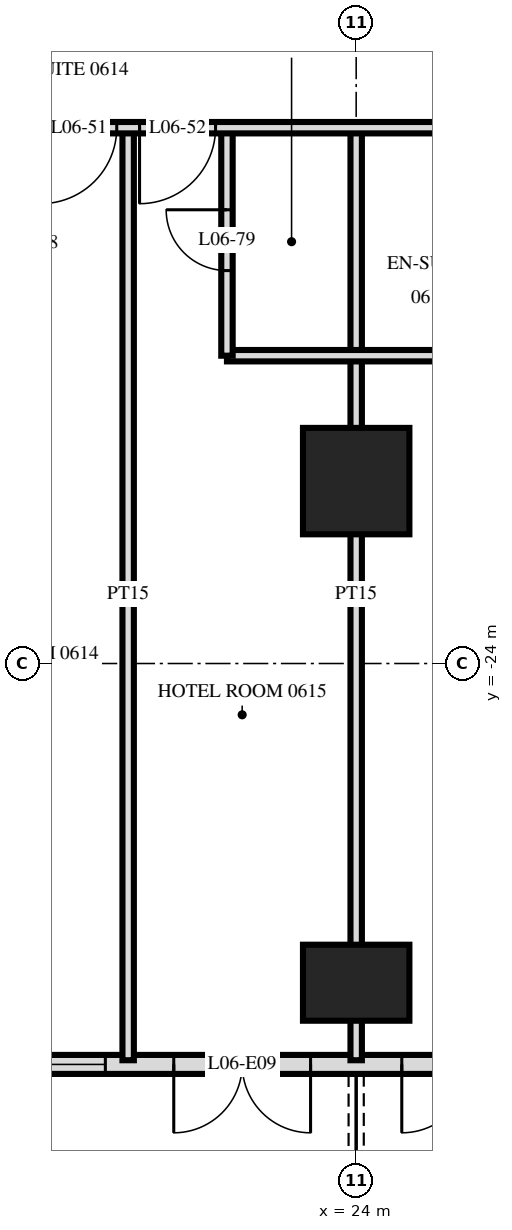
"""IFC4 building model, lengths in metres.
Left out: names, types, materials, properties, quantities, classifications, styles, units other than length and angle.
Written with IfcOpenShell. Run it as: python <this file> out.ifc"""

import sys

from ifc_helpers import new_model, si_unit, direction, frame, frame_2d, origin, origin_2d, place, context, subcontext, project, spatial, rectangle, extrude, element, fill, save


model = new_model("IFC4")
c1 = context("Model", 3, precision=1e-05, world=origin(), true_north=direction((0.0, 1.0)))
c2 = subcontext(c1, "Body", "Model", "MODEL_VIEW")
j1 = project(units=[si_unit("LENGTHUNIT", "METRE"), si_unit("PLANEANGLEUNIT", "RADIAN")], contexts=[c1])
p1 = place(None, origin())
s1 = spatial("IfcSite", under=j1, at=p1, CompositionType="ELEMENT")
p2 = place(p1, origin())
s2 = spatial("IfcBuilding", under=s1, at=p2, CompositionType="ELEMENT")
p3 = place(p2, frame((0.0, 0.0, 31.2)))
s3 = spatial("IfcBuildingStorey", under=s2, at=p3, CompositionType="ELEMENT", Elevation=31.2)
p4 = place(p3, frame((24.0, -28.2, 0.0), z_axis=(0.0, 0.0, 1.0), x_axis=(1.0, 0.0, 0.0)))
e1 = element("IfcColumn", 1, at=p4, inside=s3, PredefinedType="COLUMN", context=c2, shape_type="SweptSolid", body=[
    extrude(rectangle(XDim=1.4, YDim=1.0, at=origin_2d()), origin(), (0.0, 0.0, 1.0), 3.6),
])
p5 = place(p3, frame((24.0, -21.6, 0.0), z_axis=(0.0, 0.0, 1.0), x_axis=(1.0, 0.0, 0.0)))
e2 = element("IfcColumn", 2, at=p5, inside=s3, PredefinedType="COLUMN", context=c2, shape_type="SweptSolid", body=[
    extrude(rectangle(XDim=1.4, YDim=1.4, at=origin_2d()), origin(), (0.0, 0.0, 1.0), 3.6),
])
p6 = place(p3, frame((-28.775, -29.275, 0.0), z_axis=(0.0, 0.0, 1.0), x_axis=(1.0, 0.0, 0.0)))
e3 = element("IfcWall", 3, at=p6, inside=s3, PredefinedType="SOLIDWALL", context=c2, shape_type="SweptSolid", body=[
    extrude(rectangle(XDim=57.551, YDim=0.25, at=frame_2d((28.775, 0.0))), origin(), (0.0, 0.0, 1.0), 3.32),
])
p7 = place(p6, frame((0.575, 0.0, 0.0)))
e4 = element("IfcOpeningElement", 4, at=p7, cuts=e3, PredefinedType="OPENING", context=c2, shape_type="SweptSolid", body=[
    extrude(rectangle(XDim=1.8, YDim=2.4, at=frame_2d((0.9, 1.2))), frame((0.0, 0.135, 0.0), z_axis=(0.0, -1.0, 0.0), x_axis=(1.0, 0.0, 0.0)), (0.0, 0.0, 1.0), 0.27),
])
p8 = place(p6, frame((5.375, 0.0, 0.0)))
e5 = element("IfcOpeningElement", 5, at=p8, cuts=e3, PredefinedType="OPENING", context=c2, shape_type="SweptSolid", body=[
    extrude(rectangle(XDim=1.8, YDim=2.4, at=frame_2d((0.9, 1.2))), frame((0.0, 0.135, 0.0), z_axis=(0.0, -1.0, 0.0), x_axis=(1.0, 0.0, 0.0)), (0.0, 0.0, 1.0), 0.27),
])
p9 = place(p6, frame((8.075, 0.0, 0.3)))
e6 = element("IfcOpeningElement", 6, at=p9, cuts=e3, PredefinedType="OPENING", context=c2, shape_type="SweptSolid", body=[
    extrude(rectangle(XDim=2.4, YDim=2.1, at=frame_2d((1.2, 1.05))), frame((0.0, 0.135, 0.0), z_axis=(0.0, -1.0, 0.0), x_axis=(1.0, 0.0, 0.0)), (0.0, 0.0, 1.0), 0.27),
])
p10 = place(p6, frame((11.375, 0.0, 0.0)))
e7 = element("IfcOpeningElement", 7, at=p10, cuts=e3, PredefinedType="OPENING", context=c2, shape_type="SweptSolid", body=[
    extrude(rectangle(XDim=1.8, YDim=2.4, at=frame_2d((0.9, 1.2))), frame((0.0, 0.135, 0.0), z_axis=(0.0, -1.0, 0.0), x_axis=(1.0, 0.0, 0.0)), (0.0, 0.0, 1.0), 0.27),
])
p11 = place(p6, frame((14.075, 0.0, 0.3)))
e8 = element("IfcOpeningElement", 8, at=p11, cuts=e3, PredefinedType="OPENING", context=c2, shape_type="SweptSolid", body=[
    extrude(rectangle(XDim=2.4, YDim=2.1, at=frame_2d((1.2, 1.05))), frame((0.0, 0.135, 0.0), z_axis=(0.0, -1.0, 0.0), x_axis=(1.0, 0.0, 0.0)), (0.0, 0.0, 1.0), 0.27),
])
p12 = place(p6, frame((17.375, 0.0, 0.0)))
e9 = element("IfcOpeningElement", 9, at=p12, cuts=e3, PredefinedType="OPENING", context=c2, shape_type="SweptSolid", body=[
    extrude(rectangle(XDim=1.8, YDim=2.4, at=frame_2d((0.9, 1.2))), frame((0.0, 0.135, 0.0), z_axis=(0.0, -1.0, 0.0), x_axis=(1.0, 0.0, 0.0)), (0.0, 0.0, 1.0), 0.27),
])
p13 = place(p6, frame((20.075, 0.0, 0.3)))
e10 = element("IfcOpeningElement", 10, at=p13, cuts=e3, PredefinedType="OPENING", context=c2, shape_type="SweptSolid", body=[
    extrude(rectangle(XDim=2.4, YDim=2.1, at=frame_2d((1.2, 1.05))), frame((0.0, 0.135, 0.0), z_axis=(0.0, -1.0, 0.0), x_axis=(1.0, 0.0, 0.0)), (0.0, 0.0, 1.0), 0.27),
])
p14 = place(p6, frame((23.075, 0.0, 0.3)))
e11 = element("IfcOpeningElement", 11, at=p14, cuts=e3, PredefinedType="OPENING", context=c2, shape_type="SweptSolid", body=[
    extrude(rectangle(XDim=2.4, YDim=2.1, at=frame_2d((1.2, 1.05))), frame((0.0, 0.135, 0.0), z_axis=(0.0, -1.0, 0.0), x_axis=(1.0, 0.0, 0.0)), (0.0, 0.0, 1.0), 0.27),
])
p15 = place(p6, frame((26.375, 0.0, 0.0)))
e12 = element("IfcOpeningElement", 12, at=p15, cuts=e3, PredefinedType="OPENING", context=c2, shape_type="SweptSolid", body=[
    extrude(rectangle(XDim=1.8, YDim=2.4, at=frame_2d((0.9, 1.2))), frame((0.0, 0.135, 0.0), z_axis=(0.0, -1.0, 0.0), x_axis=(1.0, 0.0, 0.0)), (0.0, 0.0, 1.0), 0.27),
])
p16 = place(p6, frame((29.375, 0.0, 0.0)))
e13 = element("IfcOpeningElement", 13, at=p16, cuts=e3, PredefinedType="OPENING", context=c2, shape_type="SweptSolid", body=[
    extrude(rectangle(XDim=1.8, YDim=2.4, at=frame_2d((0.9, 1.2))), frame((0.0, 0.135, 0.0), z_axis=(0.0, -1.0, 0.0), x_axis=(1.0, 0.0, 0.0)), (0.0, 0.0, 1.0), 0.27),
])
p17 = place(p6, frame((32.075, 0.0, 0.3)))
e14 = element("IfcOpeningElement", 14, at=p17, cuts=e3, PredefinedType="OPENING", context=c2, shape_type="SweptSolid", body=[
    extrude(rectangle(XDim=2.4, YDim=2.1, at=frame_2d((1.2, 1.05))), frame((0.0, 0.135, 0.0), z_axis=(0.0, -1.0, 0.0), x_axis=(1.0, 0.0, 0.0)), (0.0, 0.0, 1.0), 0.27),
])
p18 = place(p6, frame((35.375, 0.0, 0.0)))
e15 = element("IfcOpeningElement", 15, at=p18, cuts=e3, PredefinedType="OPENING", context=c2, shape_type="SweptSolid", body=[
    extrude(rectangle(XDim=1.8, YDim=2.4, at=frame_2d((0.9, 1.2))), frame((0.0, 0.135, 0.0), z_axis=(0.0, -1.0, 0.0), x_axis=(1.0, 0.0, 0.0)), (0.0, 0.0, 1.0), 0.27),
])
p19 = place(p6, frame((38.075, 0.0, 0.3)))
e16 = element("IfcOpeningElement", 16, at=p19, cuts=e3, PredefinedType="OPENING", context=c2, shape_type="SweptSolid", body=[
    extrude(rectangle(XDim=2.4, YDim=2.1, at=frame_2d((1.2, 1.05))), frame((0.0, 0.135, 0.0), z_axis=(0.0, -1.0, 0.0), x_axis=(1.0, 0.0, 0.0)), (0.0, 0.0, 1.0), 0.27),
])
p20 = place(p6, frame((41.375, 0.0, 0.0)))
e17 = element("IfcOpeningElement", 17, at=p20, cuts=e3, PredefinedType="OPENING", context=c2, shape_type="SweptSolid", body=[
    extrude(rectangle(XDim=1.8, YDim=2.4, at=frame_2d((0.9, 1.2))), frame((0.0, 0.135, 0.0), z_axis=(0.0, -1.0, 0.0), x_axis=(1.0, 0.0, 0.0)), (0.0, 0.0, 1.0), 0.27),
])
p21 = place(p6, frame((44.075, 0.0, 0.3)))
e18 = element("IfcOpeningElement", 18, at=p21, cuts=e3, PredefinedType="OPENING", context=c2, shape_type="SweptSolid", body=[
    extrude(rectangle(XDim=2.4, YDim=2.1, at=frame_2d((1.2, 1.05))), frame((0.0, 0.135, 0.0), z_axis=(0.0, -1.0, 0.0), x_axis=(1.0, 0.0, 0.0)), (0.0, 0.0, 1.0), 0.27),
])
p22 = place(p6, frame((47.075, 0.0, 0.3)))
e19 = element("IfcOpeningElement", 19, at=p22, cuts=e3, PredefinedType="OPENING", context=c2, shape_type="SweptSolid", body=[
    extrude(rectangle(XDim=2.4, YDim=2.1, at=frame_2d((1.2, 1.05))), frame((0.0, 0.135, 0.0), z_axis=(0.0, -1.0, 0.0), x_axis=(1.0, 0.0, 0.0)), (0.0, 0.0, 1.0), 0.27),
])
p23 = place(p6, frame((50.375, 0.0, 0.0)))
e20 = element("IfcOpeningElement", 20, at=p23, cuts=e3, PredefinedType="OPENING", context=c2, shape_type="SweptSolid", body=[
    extrude(rectangle(XDim=1.8, YDim=2.4, at=frame_2d((0.9, 1.2))), frame((0.0, 0.135, 0.0), z_axis=(0.0, -1.0, 0.0), x_axis=(1.0, 0.0, 0.0)), (0.0, 0.0, 1.0), 0.27),
])
p24 = place(p6, frame((53.375, 0.0, 0.0)))
e21 = element("IfcOpeningElement", 21, at=p24, cuts=e3, PredefinedType="OPENING", context=c2, shape_type="SweptSolid", body=[
    extrude(rectangle(XDim=1.8, YDim=2.4, at=frame_2d((0.9, 1.2))), frame((0.0, 0.135, 0.0), z_axis=(0.0, -1.0, 0.0), x_axis=(1.0, 0.0, 0.0)), (0.0, 0.0, 1.0), 0.27),
])
p25 = place(p3, frame((24.0, -29.22, 0.0), z_axis=(0.0, 0.0, 1.0), x_axis=(0.0, 1.0, 0.0)))
e22 = element("IfcWall", 22, at=p25, inside=s3, PredefinedType="PARTITIONING", context=c2, shape_type="SweptSolid", body=[
    extrude(rectangle(XDim=12.27, YDim=0.15, at=frame_2d((6.135, 0.0))), origin(), (0.0, 0.0, 1.0), 3.32),
])
p26 = place(p3, frame((22.3, -19.95, 0.0), z_axis=(0.0, 0.0, 1.0), x_axis=(0.0, 1.0, 0.0)))
e23 = element("IfcWall", 23, at=p26, inside=s3, PredefinedType="PARTITIONING", context=c2, shape_type="SweptSolid", body=[
    extrude(rectangle(XDim=3.0, YDim=0.15, at=frame_2d((1.5, 0.0))), origin(), (0.0, 0.0, 1.0), 3.32),
])
p27 = place(p26, frame((1.12, 0.0, 0.0)))
e24 = element("IfcOpeningElement", 24, at=p27, cuts=e23, PredefinedType="OPENING", context=c2, shape_type="SweptSolid", body=[
    extrude(rectangle(XDim=0.8, YDim=2.1, at=frame_2d((0.4, 1.05))), frame((0.0, 0.085, 0.0), z_axis=(0.0, -1.0, 0.0), x_axis=(1.0, 0.0, 0.0)), (0.0, 0.0, 1.0), 0.17),
])
p28 = place(p3, frame((21.0, -29.22, 0.0), z_axis=(0.0, 0.0, 1.0), x_axis=(0.0, 1.0, 0.0)))
e25 = element("IfcWall", 25, at=p28, inside=s3, PredefinedType="PARTITIONING", context=c2, shape_type="SweptSolid", body=[
    extrude(rectangle(XDim=12.27, YDim=0.15, at=frame_2d((6.135, 0.0))), origin(), (0.0, 0.0, 1.0), 3.32),
])
p29 = place(p3, frame((22.3, -19.95, 0.0), z_axis=(0.0, 0.0, 1.0), x_axis=(1.0, 0.0, 0.0)))
e26 = element("IfcWall", 26, at=p29, inside=s3, PredefinedType="PARTITIONING", context=c2, shape_type="SweptSolid", body=[
    extrude(rectangle(XDim=4.7, YDim=0.15, at=frame_2d((2.35, 0.0))), origin(), (0.0, 0.0, 1.0), 3.32),
])
p30 = place(p3, frame((-33.12, -16.95, 0.0), z_axis=(0.0, 0.0, 1.0), x_axis=(1.0, 0.0, 0.0)))
e27 = element("IfcWall", 27, at=p30, inside=s3, PredefinedType="PARTITIONING", context=c2, shape_type="SweptSolid", body=[
    extrude(rectangle(XDim=66.24, YDim=0.15, at=frame_2d((33.12, 0.0))), origin(), (0.0, 0.0, 1.0), 3.32),
])
p31 = place(p30, frame((9.27, 0.0, 0.0)))
e28 = element("IfcOpeningElement", 28, at=p31, cuts=e27, PredefinedType="OPENING", context=c2, shape_type="SweptSolid", body=[
    extrude(rectangle(XDim=1.0, YDim=2.1, at=frame_2d((0.5, 1.05))), frame((0.0, 0.085, 0.0), z_axis=(0.0, -1.0, 0.0), x_axis=(1.0, 0.0, 0.0)), (0.0, 0.0, 1.0), 0.17),
])
p32 = place(p30, frame((13.97, 0.0, 0.0)))
e29 = element("IfcOpeningElement", 29, at=p32, cuts=e27, PredefinedType="OPENING", context=c2, shape_type="SweptSolid", body=[
    extrude(rectangle(XDim=1.0, YDim=2.1, at=frame_2d((0.5, 1.05))), frame((0.0, 0.085, 0.0), z_axis=(0.0, -1.0, 0.0), x_axis=(1.0, 0.0, 0.0)), (0.0, 0.0, 1.0), 0.17),
])
p33 = place(p30, frame((15.27, 0.0, 0.0)))
e30 = element("IfcOpeningElement", 30, at=p33, cuts=e27, PredefinedType="OPENING", context=c2, shape_type="SweptSolid", body=[
    extrude(rectangle(XDim=1.0, YDim=2.1, at=frame_2d((0.5, 1.05))), frame((0.0, 0.085, 0.0), z_axis=(0.0, -1.0, 0.0), x_axis=(1.0, 0.0, 0.0)), (0.0, 0.0, 1.0), 0.17),
])
p34 = place(p30, frame((19.97, 0.0, 0.0)))
e31 = element("IfcOpeningElement", 31, at=p34, cuts=e27, PredefinedType="OPENING", context=c2, shape_type="SweptSolid", body=[
    extrude(rectangle(XDim=1.0, YDim=2.1, at=frame_2d((0.5, 1.05))), frame((0.0, 0.085, 0.0), z_axis=(0.0, -1.0, 0.0), x_axis=(1.0, 0.0, 0.0)), (0.0, 0.0, 1.0), 0.17),
])
p35 = place(p30, frame((22.27, 0.0, 0.0)))
e32 = element("IfcOpeningElement", 32, at=p35, cuts=e27, PredefinedType="OPENING", context=c2, shape_type="SweptSolid", body=[
    extrude(rectangle(XDim=1.0, YDim=2.1, at=frame_2d((0.5, 1.05))), frame((0.0, 0.085, 0.0), z_axis=(0.0, -1.0, 0.0), x_axis=(1.0, 0.0, 0.0)), (0.0, 0.0, 1.0), 0.17),
])
p36 = place(p30, frame((28.97, 0.0, 0.0)))
e33 = element("IfcOpeningElement", 33, at=p36, cuts=e27, PredefinedType="OPENING", context=c2, shape_type="SweptSolid", body=[
    extrude(rectangle(XDim=1.0, YDim=2.1, at=frame_2d((0.5, 1.05))), frame((0.0, 0.085, 0.0), z_axis=(0.0, -1.0, 0.0), x_axis=(1.0, 0.0, 0.0)), (0.0, 0.0, 1.0), 0.17),
])
p37 = place(p30, frame((30.27, 0.0, 0.0)))
e34 = element("IfcOpeningElement", 34, at=p37, cuts=e27, PredefinedType="OPENING", context=c2, shape_type="SweptSolid", body=[
    extrude(rectangle(XDim=1.0, YDim=2.1, at=frame_2d((0.5, 1.05))), frame((0.0, 0.085, 0.0), z_axis=(0.0, -1.0, 0.0), x_axis=(1.0, 0.0, 0.0)), (0.0, 0.0, 1.0), 0.17),
])
p38 = place(p30, frame((34.97, 0.0, 0.0)))
e35 = element("IfcOpeningElement", 35, at=p38, cuts=e27, PredefinedType="OPENING", context=c2, shape_type="SweptSolid", body=[
    extrude(rectangle(XDim=1.0, YDim=2.1, at=frame_2d((0.5, 1.05))), frame((0.0, 0.085, 0.0), z_axis=(0.0, -1.0, 0.0), x_axis=(1.0, 0.0, 0.0)), (0.0, 0.0, 1.0), 0.17),
])
p39 = place(p30, frame((36.27, 0.0, 0.0)))
e36 = element("IfcOpeningElement", 36, at=p39, cuts=e27, PredefinedType="OPENING", context=c2, shape_type="SweptSolid", body=[
    extrude(rectangle(XDim=1.0, YDim=2.1, at=frame_2d((0.5, 1.05))), frame((0.0, 0.085, 0.0), z_axis=(0.0, -1.0, 0.0), x_axis=(1.0, 0.0, 0.0)), (0.0, 0.0, 1.0), 0.17),
])
p40 = place(p30, frame((40.97, 0.0, 0.0)))
e37 = element("IfcOpeningElement", 37, at=p40, cuts=e27, PredefinedType="OPENING", context=c2, shape_type="SweptSolid", body=[
    extrude(rectangle(XDim=1.0, YDim=2.1, at=frame_2d((0.5, 1.05))), frame((0.0, 0.085, 0.0), z_axis=(0.0, -1.0, 0.0), x_axis=(1.0, 0.0, 0.0)), (0.0, 0.0, 1.0), 0.17),
])
p41 = place(p30, frame((42.27, 0.0, 0.0)))
e38 = element("IfcOpeningElement", 38, at=p41, cuts=e27, PredefinedType="OPENING", context=c2, shape_type="SweptSolid", body=[
    extrude(rectangle(XDim=1.0, YDim=2.1, at=frame_2d((0.5, 1.05))), frame((0.0, 0.085, 0.0), z_axis=(0.0, -1.0, 0.0), x_axis=(1.0, 0.0, 0.0)), (0.0, 0.0, 1.0), 0.17),
])
p42 = place(p30, frame((46.97, 0.0, 0.0)))
e39 = element("IfcOpeningElement", 39, at=p42, cuts=e27, PredefinedType="OPENING", context=c2, shape_type="SweptSolid", body=[
    extrude(rectangle(XDim=1.0, YDim=2.1, at=frame_2d((0.5, 1.05))), frame((0.0, 0.085, 0.0), z_axis=(0.0, -1.0, 0.0), x_axis=(1.0, 0.0, 0.0)), (0.0, 0.0, 1.0), 0.17),
])
p43 = place(p30, frame((48.27, 0.0, 0.0)))
e40 = element("IfcOpeningElement", 40, at=p43, cuts=e27, PredefinedType="OPENING", context=c2, shape_type="SweptSolid", body=[
    extrude(rectangle(XDim=1.0, YDim=2.1, at=frame_2d((0.5, 1.05))), frame((0.0, 0.085, 0.0), z_axis=(0.0, -1.0, 0.0), x_axis=(1.0, 0.0, 0.0)), (0.0, 0.0, 1.0), 0.17),
])
p44 = place(p30, frame((52.97, 0.0, 0.0)))
e41 = element("IfcOpeningElement", 41, at=p44, cuts=e27, PredefinedType="OPENING", context=c2, shape_type="SweptSolid", body=[
    extrude(rectangle(XDim=1.0, YDim=2.1, at=frame_2d((0.5, 1.05))), frame((0.0, 0.085, 0.0), z_axis=(0.0, -1.0, 0.0), x_axis=(1.0, 0.0, 0.0)), (0.0, 0.0, 1.0), 0.17),
])
p45 = place(p30, frame((54.27, 0.0, 0.0)))
e42 = element("IfcOpeningElement", 42, at=p45, cuts=e27, PredefinedType="OPENING", context=c2, shape_type="SweptSolid", body=[
    extrude(rectangle(XDim=1.0, YDim=2.1, at=frame_2d((0.5, 1.05))), frame((0.0, 0.085, 0.0), z_axis=(0.0, -1.0, 0.0), x_axis=(1.0, 0.0, 0.0)), (0.0, 0.0, 1.0), 0.17),
])
p46 = place(p30, frame((4.4, 0.0, 0.0)))
e43 = element("IfcOpeningElement", 43, at=p46, cuts=e27, PredefinedType="OPENING", context=c2, shape_type="SweptSolid", body=[
    extrude(rectangle(XDim=1.0, YDim=2.1, at=frame_2d((0.5, 1.05))), frame((0.0, 0.085, 0.0), z_axis=(0.0, -1.0, 0.0), x_axis=(1.0, 0.0, 0.0)), (0.0, 0.0, 1.0), 0.17),
])
p47 = place(p30, frame((60.8, 0.0, 0.0)))
e44 = element("IfcOpeningElement", 44, at=p47, cuts=e27, PredefinedType="OPENING", context=c2, shape_type="SweptSolid", body=[
    extrude(rectangle(XDim=1.0, YDim=2.1, at=frame_2d((0.5, 1.05))), frame((0.0, 0.085, 0.0), z_axis=(0.0, -1.0, 0.0), x_axis=(1.0, 0.0, 0.0)), (0.0, 0.0, 1.0), 0.17),
])
p48 = place(p22, origin())
e45 = element("IfcWindow", 45, at=p48, inside=s3, PartitioningType="SINGLE_PANEL", PredefinedType="WINDOW", context=c2, shape_type="SweptSolid", body=[
    extrude(rectangle(XDim=2.4, YDim=2.1, at=frame_2d((1.2, 1.05))), frame((0.0, 0.03, 0.0), z_axis=(0.0, -1.0, 0.0), x_axis=(1.0, 0.0, 0.0)), (0.0, 0.0, 1.0), 0.06),
])
fill(e19, e45)
p49 = place(p23, frame((0.9, 0.0, 0.0), z_axis=(0.0, 0.0, 1.0), x_axis=(-1.0, 0.0, 0.0)))
e46 = element("IfcDoor", 46, at=p49, inside=s3, OperationType="DOUBLE_DOOR_SINGLE_SWING", PredefinedType="DOOR", context=c2, shape_type="SweptSolid", body=[
    extrude(rectangle(XDim=1.8, YDim=2.4, at=frame_2d((0.0, 1.2))), frame((0.0, -0.025, 0.0), z_axis=(0.0, 1.0, 0.0), x_axis=(-1.0, 0.0, 0.0)), (0.0, 0.0, 1.0), 0.05),
])
fill(e20, e46)
p50 = place(p24, frame((0.9, 0.0, 0.0), z_axis=(0.0, 0.0, 1.0), x_axis=(-1.0, 0.0, 0.0)))
e47 = element("IfcDoor", 47, at=p50, inside=s3, OperationType="DOUBLE_DOOR_SINGLE_SWING", PredefinedType="DOOR", context=c2, shape_type="SweptSolid", body=[
    extrude(rectangle(XDim=1.8, YDim=2.4, at=frame_2d((0.0, 1.2))), frame((0.0, -0.025, 0.0), z_axis=(0.0, 1.0, 0.0), x_axis=(-1.0, 0.0, 0.0)), (0.0, 0.0, 1.0), 0.05),
])
fill(e21, e47)
p51 = place(p44, frame((0.5, 0.0, 0.0), z_axis=(0.0, 0.0, 1.0), x_axis=(-1.0, 0.0, 0.0)))
e48 = element("IfcDoor", 48, at=p51, inside=s3, OperationType="SINGLE_SWING_LEFT", PredefinedType="DOOR", context=c2, shape_type="SweptSolid", body=[
    extrude(rectangle(XDim=1.0, YDim=2.1, at=frame_2d((0.0, 1.05))), frame((0.0, -0.025, 0.0), z_axis=(0.0, 1.0, 0.0), x_axis=(-1.0, 0.0, 0.0)), (0.0, 0.0, 1.0), 0.05),
])
fill(e41, e48)
p52 = place(p45, frame((0.5, 0.0, 0.0), z_axis=(0.0, 0.0, 1.0), x_axis=(-1.0, 0.0, 0.0)))
e49 = element("IfcDoor", 49, at=p52, inside=s3, OperationType="SINGLE_SWING_LEFT", PredefinedType="DOOR", context=c2, shape_type="SweptSolid", body=[
    extrude(rectangle(XDim=1.0, YDim=2.1, at=frame_2d((0.0, 1.05))), frame((0.0, -0.025, 0.0), z_axis=(0.0, 1.0, 0.0), x_axis=(-1.0, 0.0, 0.0)), (0.0, 0.0, 1.0), 0.05),
])
fill(e42, e49)
p53 = place(p27, origin())
e50 = element("IfcDoor", 50, at=p53, inside=s3, OperationType="SINGLE_SWING_LEFT", PredefinedType="DOOR", context=c2, shape_type="SweptSolid", body=[
    extrude(rectangle(XDim=0.8, YDim=2.1, at=frame_2d((0.4, 1.05))), frame((0.0, 0.025, 0.0), z_axis=(0.0, -1.0, 0.0), x_axis=(1.0, 0.0, 0.0)), (0.0, 0.0, 1.0), 0.05),
])
fill(e24, e50)
save(model, sys.argv[1])
